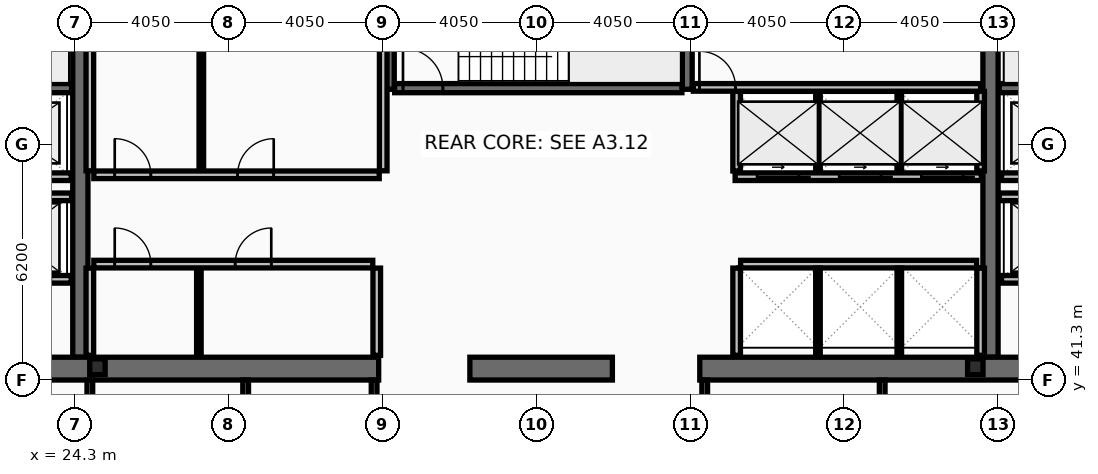
"""IFC4 building model, lengths in metres.
Left out: names, types, materials, properties, quantities, classifications, styles, units other than length and angle.
Written with IfcOpenShell. Run it as: python <this file> out.ifc"""

import sys

from ifc_helpers import new_model, si_unit, direction, frame, frame_2d, origin, origin_2d, place, context, subcontext, project, spatial, rectangle, i_section, extrude, element, fill, save


model = new_model("IFC4")
c1 = context("Model", 3, precision=1e-05, world=origin(), true_north=direction((0.0, 1.0)))
c2 = subcontext(c1, "Body", "Model", "MODEL_VIEW")
j1 = project(units=[si_unit("LENGTHUNIT", "METRE"), si_unit("PLANEANGLEUNIT", "RADIAN")], contexts=[c1])
p1 = place(None, origin())
s1 = spatial("IfcSite", under=j1, at=p1, CompositionType="ELEMENT")
p2 = place(p1, origin())
s2 = spatial("IfcBuilding", under=s1, at=p2, CompositionType="ELEMENT")
p3 = place(p2, frame((0.0, 0.0, 203.0)))
s3 = spatial("IfcBuildingStorey", under=s2, at=p3, CompositionType="ELEMENT", Elevation=203.0)
for number, where, z_axis, x_axis in (
    (1, (24.45, 41.9, 0.0), (0.0, 0.0, 1.0), (0.0, 1.0, 0.0)),
    (2, (48.4, 41.9, 0.0), (0.0, 0.0, 1.0), (0.0, 1.0, 0.0)),
):
    element("IfcWall", number, at=place(p3, frame(where, z_axis=z_axis, x_axis=x_axis)), inside=s3, PredefinedType="SHEAR", context=c2, shape_type="SweptSolid", body=[
        extrude(rectangle(XDim=11.2, YDim=0.4, at=frame_2d((5.6, 0.0))), origin(), (0.0, 0.0, 1.0), 3.44),
    ])
p4 = place(p3, frame((32.3, 41.6, 0.0), z_axis=(0.0, 0.0, 1.0), x_axis=(-1.0, 0.0, 0.0)))
e3 = element("IfcWall", 3, at=p4, inside=s3, PredefinedType="SHEAR", context=c2, shape_type="SweptSolid", body=[
    extrude(rectangle(XDim=11.45, YDim=0.6, at=frame_2d((5.725, 0.0))), origin(), (0.0, 0.0, 1.0), 3.44),
])
p5 = place(p3, frame((38.45, 41.6, 0.0), z_axis=(0.0, 0.0, 1.0), x_axis=(-1.0, 0.0, 0.0)))
e4 = element("IfcWall", 4, at=p5, inside=s3, PredefinedType="SHEAR", context=c2, shape_type="SweptSolid", body=[
    extrude(rectangle(XDim=3.75, YDim=0.6, at=frame_2d((1.875, 0.0))), origin(), (0.0, 0.0, 1.0), 3.44),
])
p6 = place(p3, frame((52.05, 41.6, 0.0), z_axis=(0.0, 0.0, 1.0), x_axis=(-1.0, 0.0, 0.0)))
e5 = element("IfcWall", 5, at=p6, inside=s3, PredefinedType="SHEAR", context=c2, shape_type="SweptSolid", body=[
    extrude(rectangle(XDim=11.3, YDim=0.6, at=frame_2d((5.65, 0.0))), origin(), (0.0, 0.0, 1.0), 3.44),
])
for number, where, z_axis, x_axis in (
    (6, (32.58, 48.95, 0.0), (0.0, 0.0, 1.0), (0.0, 1.0, 0.0)),
    (7, (40.42, 48.95, 0.0), (0.0, 0.0, 1.0), (0.0, 1.0, 0.0)),
):
    element("IfcWall", number, at=place(p3, frame(where, z_axis=z_axis, x_axis=x_axis)), inside=s3, PredefinedType="SHEAR", context=c2, shape_type="SweptSolid", body=[
        extrude(rectangle(XDim=4.15, YDim=0.26, at=frame_2d((2.075, 0.0))), origin(), (0.0, 0.0, 1.0), 3.44),
    ])
p7 = place(p3, frame((16.8, 48.98, 0.0), z_axis=(0.0, 0.0, 1.0), x_axis=(1.0, 0.0, 0.0)))
e8 = element("IfcWall", 8, at=p7, inside=s3, PredefinedType="SHEAR", context=c2, shape_type="SweptSolid", body=[
    extrude(rectangle(XDim=7.42, YDim=0.24, at=frame_2d((3.71, 0.0))), origin(), (0.0, 0.0, 1.0), 3.44),
])
p8 = place(p7, frame((0.22, 0.0, 0.0)))
e9 = element("IfcOpeningElement", 9, at=p8, cuts=e8, PredefinedType="OPENING", context=c2, shape_type="SweptSolid", body=[
    extrude(rectangle(XDim=1.05, YDim=2.15, at=frame_2d((0.525, 1.075))), frame((0.0, 0.13, 0.0), z_axis=(0.0, -1.0, 0.0), x_axis=(1.0, 0.0, 0.0)), (0.0, 0.0, 1.0), 0.26),
])
p9 = place(p3, frame((48.63, 48.98, 0.0), z_axis=(0.0, 0.0, 1.0), x_axis=(1.0, 0.0, 0.0)))
e10 = element("IfcWall", 10, at=p9, inside=s3, PredefinedType="SHEAR", context=c2, shape_type="SweptSolid", body=[
    extrude(rectangle(XDim=7.47, YDim=0.24, at=frame_2d((3.735, 0.0))), origin(), (0.0, 0.0, 1.0), 3.44),
])
p10 = place(p9, frame((6.2, 0.0, 0.0)))
e11 = element("IfcOpeningElement", 11, at=p10, cuts=e10, PredefinedType="OPENING", context=c2, shape_type="SweptSolid", body=[
    extrude(rectangle(XDim=1.05, YDim=2.15, at=frame_2d((0.525, 1.075))), frame((0.0, 0.13, 0.0), z_axis=(0.0, -1.0, 0.0), x_axis=(1.0, 0.0, 0.0)), (0.0, 0.0, 1.0), 0.26),
])
p11 = place(p3, frame((32.72, 48.98, 0.0), z_axis=(0.0, 0.0, 1.0), x_axis=(1.0, 0.0, 0.0)))
e12 = element("IfcWall", 12, at=p11, inside=s3, PredefinedType="SHEAR", context=c2, shape_type="SweptSolid", body=[
    extrude(rectangle(XDim=7.56, YDim=0.24, at=frame_2d((3.78, 0.0))), origin(), (0.0, 0.0, 1.0), 3.44),
])
p12 = place(p11, frame((0.22, 0.0, 0.0)))
e13 = element("IfcOpeningElement", 13, at=p12, cuts=e12, PredefinedType="OPENING", context=c2, shape_type="SweptSolid", body=[
    extrude(rectangle(XDim=1.05, YDim=2.15, at=frame_2d((0.525, 1.075))), frame((0.0, 0.13, 0.0), z_axis=(0.0, -1.0, 0.0), x_axis=(1.0, 0.0, 0.0)), (0.0, 0.0, 1.0), 0.26),
])
for number, where, z_axis, x_axis in (
    (14, (24.9, 41.65, 0.0), (0.0, 0.0, 1.0), (1.0, 0.0, 0.0)),
    (15, (48.0, 41.65, 0.0), (0.0, 0.0, 1.0), (1.0, 0.0, 0.0)),
):
    element("IfcColumn", number, at=place(p3, frame(where, z_axis=z_axis, x_axis=x_axis)), inside=s3, PredefinedType="COLUMN", context=c2, shape_type="SweptSolid", body=[
        extrude(i_section(OverallWidth=0.406, OverallDepth=0.416, WebThickness=0.03, FlangeThickness=0.048, at=origin_2d()), origin(), (0.0, 0.0, 1.0), 3.6),
    ])
p13 = place(p3, frame((51.61, 43.95, 0.0), z_axis=(0.0, 0.0, 1.0), x_axis=(-1.0, 0.0, 0.0)))
e16 = element("IfcWall", 16, at=p13, inside=s3, PredefinedType="PARTITIONING", context=c2, shape_type="SweptSolid", body=[
    extrude(rectangle(XDim=2.92, YDim=0.2, at=frame_2d((1.46, 0.0))), origin(), (0.0, 0.0, 1.0), 3.44),
])
p14 = place(p13, frame((0.81, 0.0, 0.0)))
e17 = element("IfcOpeningElement", 17, at=p14, cuts=e16, PredefinedType="OPENING", context=c2, shape_type="SweptSolid", body=[
    extrude(rectangle(XDim=1.3, YDim=2.18, at=frame_2d((0.65, 1.09))), frame((0.0, 0.11, 0.0), z_axis=(0.0, -1.0, 0.0), x_axis=(1.0, 0.0, 0.0)), (0.0, 0.0, 1.0), 0.22),
])
p15 = place(p3, frame((24.21, 43.95, 0.0), z_axis=(0.0, 0.0, 1.0), x_axis=(-1.0, 0.0, 0.0)))
e18 = element("IfcWall", 18, at=p15, inside=s3, PredefinedType="PARTITIONING", context=c2, shape_type="SweptSolid", body=[
    extrude(rectangle(XDim=2.97, YDim=0.2, at=frame_2d((1.485, 0.0))), origin(), (0.0, 0.0, 1.0), 3.44),
])
p16 = place(p15, frame((0.86, 0.0, 0.0)))
e19 = element("IfcOpeningElement", 19, at=p16, cuts=e18, PredefinedType="OPENING", context=c2, shape_type="SweptSolid", body=[
    extrude(rectangle(XDim=1.3, YDim=2.18, at=frame_2d((0.65, 1.09))), frame((0.0, 0.11, 0.0), z_axis=(0.0, -1.0, 0.0), x_axis=(1.0, 0.0, 0.0)), (0.0, 0.0, 1.0), 0.22),
])
p17 = place(p3, frame((51.61, 46.65, 0.0), z_axis=(0.0, 0.0, 1.0), x_axis=(-1.0, 0.0, 0.0)))
e20 = element("IfcWall", 20, at=p17, inside=s3, PredefinedType="PARTITIONING", context=c2, shape_type="SweptSolid", body=[
    extrude(rectangle(XDim=2.92, YDim=0.2, at=frame_2d((1.46, 0.0))), origin(), (0.0, 0.0, 1.0), 3.44),
])
p18 = place(p17, frame((0.86, 0.0, 0.0)))
e21 = element("IfcOpeningElement", 21, at=p18, cuts=e20, PredefinedType="OPENING", context=c2, shape_type="SweptSolid", body=[
    extrude(rectangle(XDim=1.2, YDim=2.18, at=frame_2d((0.6, 1.09))), frame((0.0, 0.11, 0.0), z_axis=(0.0, -1.0, 0.0), x_axis=(1.0, 0.0, 0.0)), (0.0, 0.0, 1.0), 0.22),
])
p19 = place(p3, frame((24.21, 46.65, 0.0), z_axis=(0.0, 0.0, 1.0), x_axis=(-1.0, 0.0, 0.0)))
e22 = element("IfcWall", 22, at=p19, inside=s3, PredefinedType="PARTITIONING", context=c2, shape_type="SweptSolid", body=[
    extrude(rectangle(XDim=2.97, YDim=0.2, at=frame_2d((1.485, 0.0))), origin(), (0.0, 0.0, 1.0), 3.44),
])
p20 = place(p19, frame((0.91, 0.0, 0.0)))
e23 = element("IfcOpeningElement", 23, at=p20, cuts=e22, PredefinedType="OPENING", context=c2, shape_type="SweptSolid", body=[
    extrude(rectangle(XDim=1.2, YDim=2.18, at=frame_2d((0.6, 1.09))), frame((0.0, 0.11, 0.0), z_axis=(0.0, -1.0, 0.0), x_axis=(1.0, 0.0, 0.0)), (0.0, 0.0, 1.0), 0.22),
])
p21 = place(p3, frame((48.16, 46.65, 0.0), z_axis=(0.0, 0.0, 1.0), x_axis=(-1.0, 0.0, 0.0)))
e24 = element("IfcWall", 24, at=p21, inside=s3, PredefinedType="PARTITIONING", context=c2, shape_type="SweptSolid", body=[
    extrude(rectangle(XDim=6.48, YDim=0.2, at=frame_2d((3.24, 0.0))), origin(), (0.0, 0.0, 1.0), 3.44),
])
p22 = place(p21, frame((4.8, 0.0, 0.0)))
e25 = element("IfcOpeningElement", 25, at=p22, cuts=e24, PredefinedType="OPENING", context=c2, shape_type="SweptSolid", body=[
    extrude(rectangle(XDim=1.1, YDim=2.18, at=frame_2d((0.55, 1.09))), frame((0.0, 0.11, 0.0), z_axis=(0.0, -1.0, 0.0), x_axis=(1.0, 0.0, 0.0)), (0.0, 0.0, 1.0), 0.22),
])
p23 = place(p21, frame((2.64, 0.0, 0.0)))
e26 = element("IfcOpeningElement", 26, at=p23, cuts=e24, PredefinedType="OPENING", context=c2, shape_type="SweptSolid", body=[
    extrude(rectangle(XDim=1.1, YDim=2.18, at=frame_2d((0.55, 1.09))), frame((0.0, 0.11, 0.0), z_axis=(0.0, -1.0, 0.0), x_axis=(1.0, 0.0, 0.0)), (0.0, 0.0, 1.0), 0.22),
])
p24 = place(p21, frame((0.48, 0.0, 0.0)))
e27 = element("IfcOpeningElement", 27, at=p24, cuts=e24, PredefinedType="OPENING", context=c2, shape_type="SweptSolid", body=[
    extrude(rectangle(XDim=1.1, YDim=2.18, at=frame_2d((0.55, 1.09))), frame((0.0, 0.11, 0.0), z_axis=(0.0, -1.0, 0.0), x_axis=(1.0, 0.0, 0.0)), (0.0, 0.0, 1.0), 0.22),
])
p25 = place(p3, frame((21.2, 46.12, 0.0), z_axis=(0.0, 0.0, 1.0), x_axis=(1.0, 0.0, 0.0)))
e28 = element("IfcWall", 28, at=p25, inside=s3, PredefinedType="PARTITIONING", context=c2, shape_type="SweptSolid", body=[
    extrude(rectangle(XDim=3.02, YDim=0.2, at=frame_2d((1.51, 0.0))), origin(), (0.0, 0.0, 1.0), 3.44),
])
p26 = place(p3, frame((48.63, 46.12, 0.0), z_axis=(0.0, 0.0, 1.0), x_axis=(1.0, 0.0, 0.0)))
e29 = element("IfcWall", 29, at=p26, inside=s3, PredefinedType="PARTITIONING", context=c2, shape_type="SweptSolid", body=[
    extrude(rectangle(XDim=3.07, YDim=0.2, at=frame_2d((1.535, 0.0))), origin(), (0.0, 0.0, 1.0), 3.44),
])
for number, where, z_axis, x_axis in (
    (30, (24.7, 46.805, 0.0), (0.0, 0.0, 1.0), (0.0, 1.0, 0.0)),
    (31, (32.42, 46.805, 0.0), (0.0, 0.0, 1.0), (0.0, 1.0, 0.0)),
):
    element("IfcWall", number, at=place(p3, frame(where, z_axis=z_axis, x_axis=x_axis)), inside=s3, PredefinedType="PARTITIONING", context=c2, shape_type="SweptSolid", body=[
        extrude(rectangle(XDim=5.99, YDim=0.2, at=frame_2d((2.995, 0.0))), origin(), (0.0, 0.0, 1.0), 3.44),
    ])
p27 = place(p3, frame((27.634, 46.805, 0.0), z_axis=(0.0, 0.0, 1.0), x_axis=(0.0, 1.0, 0.0)))
e32 = element("IfcWall", 32, at=p27, inside=s3, PredefinedType="PARTITIONING", context=c2, shape_type="SweptSolid", body=[
    extrude(rectangle(XDim=5.99, YDim=0.12, at=frame_2d((2.995, 0.0))), origin(), (0.0, 0.0, 1.0), 3.44),
])
p28 = place(p3, frame((24.805, 46.7, 0.0), z_axis=(0.0, 0.0, 1.0), x_axis=(1.0, 0.0, 0.0)))
e33 = element("IfcWall", 33, at=p28, inside=s3, PredefinedType="PARTITIONING", context=c2, shape_type="SweptSolid", body=[
    extrude(rectangle(XDim=7.51, YDim=0.2, at=frame_2d((3.755, 0.0))), origin(), (0.0, 0.0, 1.0), 3.44),
])
p29 = place(p28, frame((0.55, 0.0, 0.0)))
e34 = element("IfcOpeningElement", 34, at=p29, cuts=e33, PredefinedType="OPENING", context=c2, shape_type="SweptSolid", body=[
    extrude(rectangle(XDim=0.95, YDim=2.1, at=frame_2d((0.475, 1.05))), frame((0.0, 0.11, 0.0), z_axis=(0.0, -1.0, 0.0), x_axis=(1.0, 0.0, 0.0)), (0.0, 0.0, 1.0), 0.22),
])
p30 = place(p28, frame((3.784, 0.0, 0.0)))
e35 = element("IfcOpeningElement", 35, at=p30, cuts=e33, PredefinedType="OPENING", context=c2, shape_type="SweptSolid", body=[
    extrude(rectangle(XDim=0.95, YDim=2.1, at=frame_2d((0.475, 1.05))), frame((0.0, 0.11, 0.0), z_axis=(0.0, -1.0, 0.0), x_axis=(1.0, 0.0, 0.0)), (0.0, 0.0, 1.0), 0.22),
])
for number, where, z_axis, x_axis in (
    (36, (24.7, 41.95, 0.0), (0.0, 0.0, 1.0), (0.0, 1.0, 0.0)),
    (37, (32.25, 41.95, 0.0), (0.0, 0.0, 1.0), (0.0, 1.0, 0.0)),
):
    element("IfcWall", number, at=place(p3, frame(where, z_axis=z_axis, x_axis=x_axis)), inside=s3, PredefinedType="PARTITIONING", context=c2, shape_type="SweptSolid", body=[
        extrude(rectangle(XDim=2.295, YDim=0.2, at=frame_2d((1.147, 0.0))), origin(), (0.0, 0.0, 1.0), 3.44),
    ])
p31 = place(p3, frame((27.569, 41.95, 0.0), z_axis=(0.0, 0.0, 1.0), x_axis=(0.0, 1.0, 0.0)))
e38 = element("IfcWall", 38, at=p31, inside=s3, PredefinedType="PARTITIONING", context=c2, shape_type="SweptSolid", body=[
    extrude(rectangle(XDim=2.295, YDim=0.12, at=frame_2d((1.147, 0.0))), origin(), (0.0, 0.0, 1.0), 3.44),
])
p32 = place(p3, frame((24.805, 44.35, 0.0), z_axis=(0.0, 0.0, 1.0), x_axis=(1.0, 0.0, 0.0)))
e39 = element("IfcWall", 39, at=p32, inside=s3, PredefinedType="PARTITIONING", context=c2, shape_type="SweptSolid", body=[
    extrude(rectangle(XDim=7.34, YDim=0.2, at=frame_2d((3.67, 0.0))), origin(), (0.0, 0.0, 1.0), 3.44),
])
p33 = place(p32, frame((0.55, 0.0, 0.0)))
e40 = element("IfcOpeningElement", 40, at=p33, cuts=e39, PredefinedType="OPENING", context=c2, shape_type="SweptSolid", body=[
    extrude(rectangle(XDim=0.95, YDim=2.1, at=frame_2d((0.475, 1.05))), frame((0.0, 0.11, 0.0), z_axis=(0.0, -1.0, 0.0), x_axis=(1.0, 0.0, 0.0)), (0.0, 0.0, 1.0), 0.22),
])
p34 = place(p32, frame((3.719, 0.0, 0.0)))
e41 = element("IfcOpeningElement", 41, at=p34, cuts=e39, PredefinedType="OPENING", context=c2, shape_type="SweptSolid", body=[
    extrude(rectangle(XDim=0.95, YDim=2.1, at=frame_2d((0.475, 1.05))), frame((0.0, 0.11, 0.0), z_axis=(0.0, -1.0, 0.0), x_axis=(1.0, 0.0, 0.0)), (0.0, 0.0, 1.0), 0.22),
])
for number, where, z_axis, x_axis in (
    (42, (41.72, 46.8, 0.0), (0.0, 0.0, 1.0), (0.0, 1.0, 0.0)),
    (43, (48.14, 46.8, 0.0), (0.0, 0.0, 1.0), (0.0, 1.0, 0.0)),
):
    element("IfcWall", number, at=place(p3, frame(where, z_axis=z_axis, x_axis=x_axis)), inside=s3, PredefinedType="PARTITIONING", context=c2, shape_type="SweptSolid", body=[
        extrude(rectangle(XDim=2.095, YDim=0.2, at=frame_2d((1.047, 0.0))), origin(), (0.0, 0.0, 1.0), 3.44),
    ])
for number, where, z_axis, x_axis in (
    (44, (43.86, 46.8, 0.0), (0.0, 0.0, 1.0), (0.0, 1.0, 0.0)),
    (45, (46.0, 46.8, 0.0), (0.0, 0.0, 1.0), (0.0, 1.0, 0.0)),
):
    element("IfcWall", number, at=place(p3, frame(where, z_axis=z_axis, x_axis=x_axis)), inside=s3, PredefinedType="PARTITIONING", context=c2, shape_type="SweptSolid", body=[
        extrude(rectangle(XDim=2.095, YDim=0.12, at=frame_2d((1.047, 0.0))), origin(), (0.0, 0.0, 1.0), 3.44),
    ])
p35 = place(p3, frame((41.825, 44.35, 0.0), z_axis=(0.0, 0.0, 1.0), x_axis=(1.0, 0.0, 0.0)))
e46 = element("IfcWall", 46, at=p35, inside=s3, PredefinedType="PARTITIONING", context=c2, shape_type="SweptSolid", body=[
    extrude(rectangle(XDim=6.21, YDim=0.2, at=frame_2d((3.105, 0.0))), origin(), (0.0, 0.0, 1.0), 3.44),
])
for number, where, z_axis, x_axis in (
    (47, (41.72, 41.95, 0.0), (0.0, 0.0, 1.0), (0.0, 1.0, 0.0)),
    (48, (48.14, 41.95, 0.0), (0.0, 0.0, 1.0), (0.0, 1.0, 0.0)),
):
    element("IfcWall", number, at=place(p3, frame(where, z_axis=z_axis, x_axis=x_axis)), inside=s3, PredefinedType="PARTITIONING", context=c2, shape_type="SweptSolid", body=[
        extrude(rectangle(XDim=2.295, YDim=0.2, at=frame_2d((1.147, 0.0))), origin(), (0.0, 0.0, 1.0), 3.44),
    ])
for number, where, z_axis, x_axis in (
    (49, (43.86, 41.95, 0.0), (0.0, 0.0, 1.0), (0.0, 1.0, 0.0)),
    (50, (46.0, 41.95, 0.0), (0.0, 0.0, 1.0), (0.0, 1.0, 0.0)),
):
    element("IfcWall", number, at=place(p3, frame(where, z_axis=z_axis, x_axis=x_axis)), inside=s3, PredefinedType="PARTITIONING", context=c2, shape_type="SweptSolid", body=[
        extrude(rectangle(XDim=2.295, YDim=0.12, at=frame_2d((1.147, 0.0))), origin(), (0.0, 0.0, 1.0), 3.44),
    ])
p36 = place(p3, frame((40.58, 49.0, 0.0), z_axis=(0.0, 0.0, 1.0), x_axis=(1.0, 0.0, 0.0)))
e51 = element("IfcWall", 51, at=p36, inside=s3, PredefinedType="PARTITIONING", context=c2, shape_type="SweptSolid", body=[
    extrude(rectangle(XDim=7.56, YDim=0.2, at=frame_2d((3.78, 0.0))), origin(), (0.0, 0.0, 1.0), 3.44),
])
p37 = place(p36, frame((0.16, 0.0, 0.0)))
e52 = element("IfcOpeningElement", 52, at=p37, cuts=e51, PredefinedType="OPENING", context=c2, shape_type="SweptSolid", body=[
    extrude(rectangle(XDim=0.95, YDim=2.1, at=frame_2d((0.475, 1.05))), frame((0.0, 0.11, 0.0), z_axis=(0.0, -1.0, 0.0), x_axis=(1.0, 0.0, 0.0)), (0.0, 0.0, 1.0), 0.22),
])
p38 = place(p3, frame((24.7, 38.28, 0.0), z_axis=(0.0, 0.0, 1.0), x_axis=(0.0, 1.0, 0.0)))
e53 = element("IfcWall", 53, at=p38, inside=s3, PredefinedType="PARTITIONING", context=c2, shape_type="SweptSolid", body=[
    extrude(rectangle(XDim=3.02, YDim=0.15, at=frame_2d((1.51, 0.0))), origin(), (0.0, 0.0, 1.0), 2.73),
])
for number, where, z_axis, x_axis in (
    (54, (28.8, 38.28, 0.0), (0.0, 0.0, 1.0), (0.0, 1.0, 0.0)),
    (55, (32.18, 38.28, 0.0), (0.0, 0.0, 1.0), (0.0, 1.0, 0.0)),
    (56, (40.88, 38.28, 0.0), (0.0, 0.0, 1.0), (0.0, 1.0, 0.0)),
    (57, (45.55, 38.28, 0.0), (0.0, 0.0, 1.0), (0.0, 1.0, 0.0)),
):
    element("IfcWall", number, at=place(p3, frame(where, z_axis=z_axis, x_axis=x_axis)), inside=s3, PredefinedType="PARTITIONING", context=c2, shape_type="SweptSolid", body=[
        extrude(rectangle(XDim=3.02, YDim=0.15, at=frame_2d((1.51, 0.0))), origin(), (0.0, 0.0, 1.0), 3.44),
    ])
p39 = place(p12, origin())
e58 = element("IfcDoor", 58, at=p39, inside=s3, OperationType="SINGLE_SWING_LEFT", PredefinedType="DOOR", context=c2, shape_type="SweptSolid", body=[
    extrude(rectangle(XDim=1.05, YDim=2.15, at=frame_2d((0.525, 1.075))), frame((0.0, 0.025, 0.0), z_axis=(0.0, -1.0, 0.0), x_axis=(1.0, 0.0, 0.0)), (0.0, 0.0, 1.0), 0.05),
])
fill(e13, e58)
p40 = place(p22, origin())
e59 = element("IfcDoor", 59, at=p40, inside=s3, OperationType="SLIDING_TO_LEFT", PredefinedType="DOOR", context=c2, shape_type="SweptSolid", body=[
    extrude(rectangle(XDim=1.1, YDim=2.18, at=frame_2d((0.55, 1.09))), frame((0.0, 0.025, 0.0), z_axis=(0.0, -1.0, 0.0), x_axis=(1.0, 0.0, 0.0)), (0.0, 0.0, 1.0), 0.05),
])
fill(e25, e59)
p41 = place(p23, origin())
e60 = element("IfcDoor", 60, at=p41, inside=s3, OperationType="SLIDING_TO_LEFT", PredefinedType="DOOR", context=c2, shape_type="SweptSolid", body=[
    extrude(rectangle(XDim=1.1, YDim=2.18, at=frame_2d((0.55, 1.09))), frame((0.0, 0.025, 0.0), z_axis=(0.0, -1.0, 0.0), x_axis=(1.0, 0.0, 0.0)), (0.0, 0.0, 1.0), 0.05),
])
fill(e26, e60)
p42 = place(p24, origin())
e61 = element("IfcDoor", 61, at=p42, inside=s3, OperationType="SLIDING_TO_LEFT", PredefinedType="DOOR", context=c2, shape_type="SweptSolid", body=[
    extrude(rectangle(XDim=1.1, YDim=2.18, at=frame_2d((0.55, 1.09))), frame((0.0, 0.025, 0.0), z_axis=(0.0, -1.0, 0.0), x_axis=(1.0, 0.0, 0.0)), (0.0, 0.0, 1.0), 0.05),
])
fill(e27, e61)
p43 = place(p29, origin())
e62 = element("IfcDoor", 62, at=p43, inside=s3, OperationType="SINGLE_SWING_LEFT", PredefinedType="DOOR", context=c2, shape_type="SweptSolid", body=[
    extrude(rectangle(XDim=0.95, YDim=2.1, at=frame_2d((0.475, 1.05))), frame((0.0, 0.025, 0.0), z_axis=(0.0, -1.0, 0.0), x_axis=(1.0, 0.0, 0.0)), (0.0, 0.0, 1.0), 0.05),
])
fill(e34, e62)
p44 = place(p30, origin())
e63 = element("IfcDoor", 63, at=p44, inside=s3, OperationType="SINGLE_SWING_RIGHT", PredefinedType="DOOR", context=c2, shape_type="SweptSolid", body=[
    extrude(rectangle(XDim=0.95, YDim=2.1, at=frame_2d((0.475, 1.05))), frame((0.0, 0.025, 0.0), z_axis=(0.0, -1.0, 0.0), x_axis=(1.0, 0.0, 0.0)), (0.0, 0.0, 1.0), 0.05),
])
fill(e35, e63)
p45 = place(p33, origin())
e64 = element("IfcDoor", 64, at=p45, inside=s3, OperationType="SINGLE_SWING_LEFT", PredefinedType="DOOR", context=c2, shape_type="SweptSolid", body=[
    extrude(rectangle(XDim=0.95, YDim=2.1, at=frame_2d((0.475, 1.05))), frame((0.0, 0.025, 0.0), z_axis=(0.0, -1.0, 0.0), x_axis=(1.0, 0.0, 0.0)), (0.0, 0.0, 1.0), 0.05),
])
fill(e40, e64)
p46 = place(p34, origin())
e65 = element("IfcDoor", 65, at=p46, inside=s3, OperationType="SINGLE_SWING_RIGHT", PredefinedType="DOOR", context=c2, shape_type="SweptSolid", body=[
    extrude(rectangle(XDim=0.95, YDim=2.1, at=frame_2d((0.475, 1.05))), frame((0.0, 0.025, 0.0), z_axis=(0.0, -1.0, 0.0), x_axis=(1.0, 0.0, 0.0)), (0.0, 0.0, 1.0), 0.05),
])
fill(e41, e65)
p47 = place(p37, origin())
e66 = element("IfcDoor", 66, at=p47, inside=s3, OperationType="SINGLE_SWING_LEFT", PredefinedType="DOOR", context=c2, shape_type="SweptSolid", body=[
    extrude(rectangle(XDim=0.95, YDim=2.1, at=frame_2d((0.475, 1.05))), frame((0.0, 0.025, 0.0), z_axis=(0.0, -1.0, 0.0), x_axis=(1.0, 0.0, 0.0)), (0.0, 0.0, 1.0), 0.05),
])
fill(e52, e66)
save(model, sys.argv[1])
